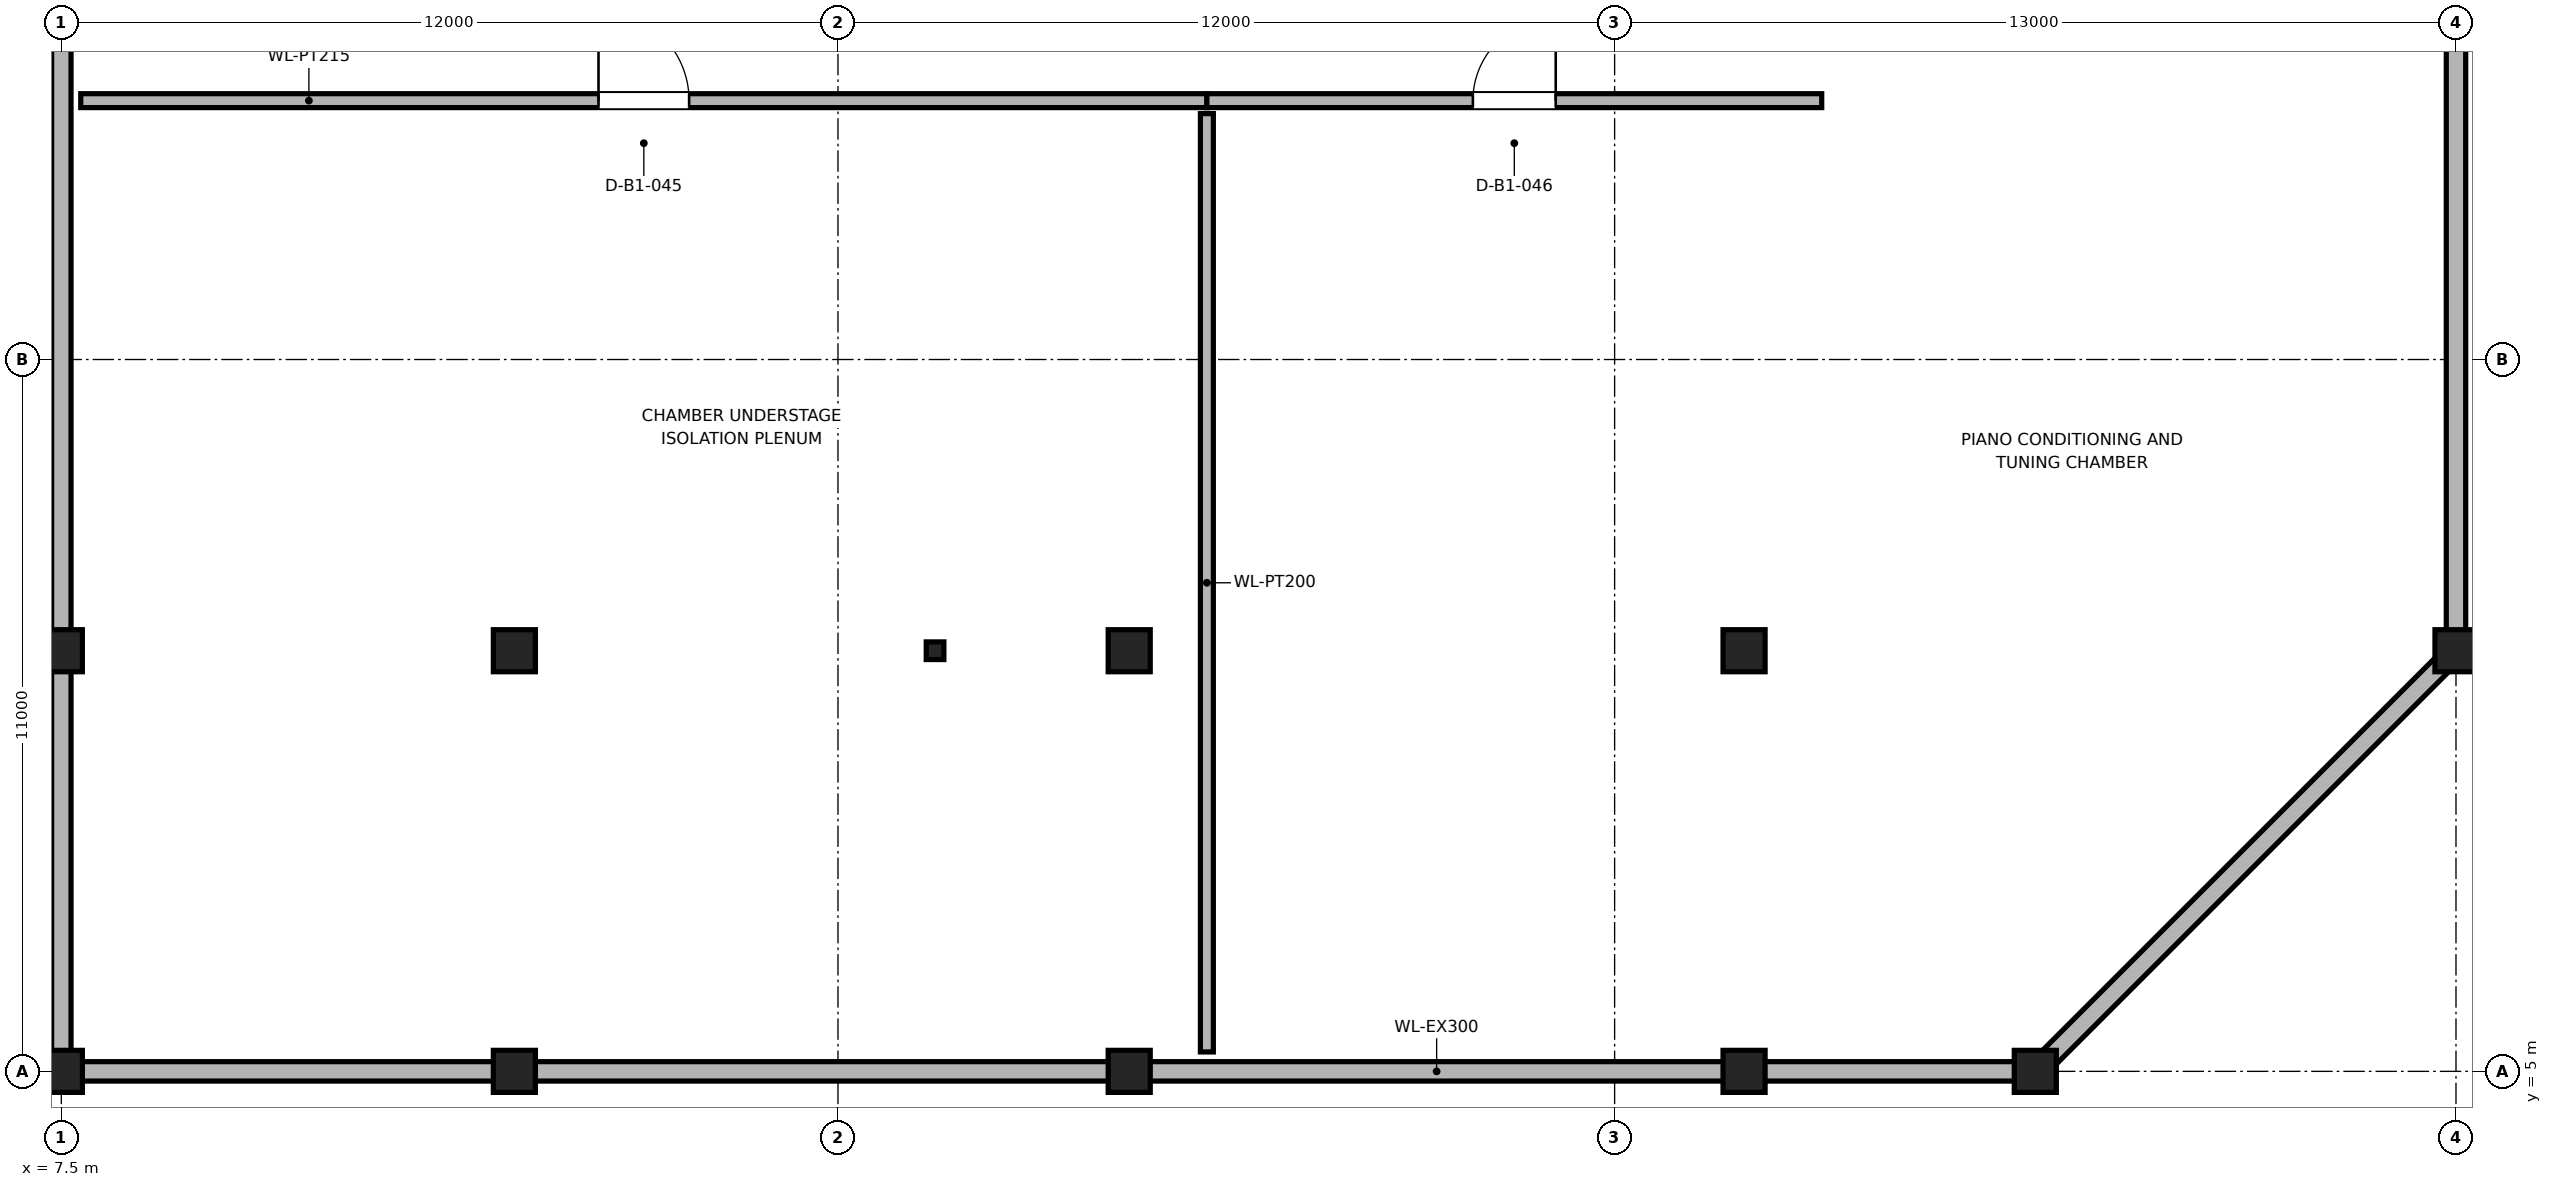
"""IFC4 building model, lengths in metres.
Left out: names, types, materials, properties, quantities, classifications, styles, units other than length and angle.
Written with IfcOpenShell. Run it as: python <this file> out.ifc"""

import sys

from ifc_helpers import new_model, si_unit, direction, frame, frame_2d, origin, origin_2d, place, context, subcontext, project, spatial, rectangle, hollow_circle, extrude, element, fill, save


model = new_model("IFC4")
c1 = context("Model", 3, precision=1e-05, world=origin(), true_north=direction((0.0, 1.0)))
c2 = subcontext(c1, "Body", "Model", "MODEL_VIEW")
j1 = project(units=[si_unit("LENGTHUNIT", "METRE"), si_unit("PLANEANGLEUNIT", "RADIAN")], contexts=[c1])
p1 = place(None, origin())
s1 = spatial("IfcSite", under=j1, at=p1, CompositionType="ELEMENT")
p2 = place(p1, origin())
s2 = spatial("IfcBuilding", under=s1, at=p2, CompositionType="ELEMENT")
p3 = place(p2, frame((0.0, 0.0, -4.8)))
s3 = spatial("IfcBuildingStorey", under=s2, at=p3, CompositionType="ELEMENT", Elevation=-4.8)
for number, where, z_axis, x_axis in (
    (1, (7.5, 5.0, 0.0), (0.0, 0.0, 1.0), (1.0, 0.0, 0.0)),
    (2, (14.5, 5.0, 0.0), (0.0, 0.0, 1.0), (1.0, 0.0, 0.0)),
    (3, (24.0, 5.0, 0.0), (0.0, 0.0, 1.0), (1.0, 0.0, 0.0)),
    (4, (33.5, 5.0, 0.0), (0.0, 0.0, 1.0), (1.0, 0.0, 0.0)),
    (5, (38.0, 5.0, 0.0), (0.0, 0.0, 1.0), (1.0, 0.0, 0.0)),
    (6, (44.5, 11.5, 0.0), (0.0, 0.0, 1.0), (1.0, 0.0, 0.0)),
    (7, (7.5, 11.5, 0.0), (0.0, 0.0, 1.0), (1.0, 0.0, 0.0)),
    (8, (14.5, 11.5, 0.0), (0.0, 0.0, 1.0), (1.0, 0.0, 0.0)),
    (9, (24.0, 11.5, 0.0), (0.0, 0.0, 1.0), (1.0, 0.0, 0.0)),
    (10, (33.5, 11.5, 0.0), (0.0, 0.0, 1.0), (1.0, 0.0, 0.0)),
):
    element("IfcColumn", number, at=place(p3, frame(where, z_axis=z_axis, x_axis=x_axis)), inside=s3, PredefinedType="COLUMN", context=c2, shape_type="SweptSolid", body=[
        extrude(rectangle(XDim=0.65, YDim=0.65, at=origin_2d()), origin(), (0.0, 0.0, 1.0), 4.8),
    ])
p4 = place(p3, frame((21.0, 11.5, 0.0), z_axis=(0.0, 0.0, 1.0), x_axis=(1.0, 0.0, 0.0)))
e11 = element("IfcColumn", 11, at=p4, inside=s3, PredefinedType="COLUMN", context=c2, shape_type="SweptSolid", body=[
    extrude(hollow_circle(Radius=0.136, WallThickness=0.016, at=origin_2d()), origin(), (0.0, 0.0, 1.0), 4.8),
])
p5 = place(p3, frame((14.48, 5.0, 0.0), z_axis=(0.0, 0.0, 1.0), x_axis=(-1.0, 0.0, 0.0)))
e12 = element("IfcWall", 12, at=p5, inside=s3, PredefinedType="SOLIDWALL", context=c2, shape_type="SweptSolid", body=[
    extrude(rectangle(XDim=6.96, YDim=0.3, at=frame_2d((3.48, 0.0))), origin(), (0.0, 0.0, 1.0), 3.738),
])
for number, where, z_axis, x_axis in (
    (13, (23.98, 5.0, 0.0), (0.0, 0.0, 1.0), (-1.0, 0.0, 0.0)),
    (14, (33.48, 5.0, 0.0), (0.0, 0.0, 1.0), (-1.0, 0.0, 0.0)),
):
    element("IfcWall", number, at=place(p3, frame(where, z_axis=z_axis, x_axis=x_axis)), inside=s3, PredefinedType="SOLIDWALL", context=c2, shape_type="SweptSolid", body=[
        extrude(rectangle(XDim=9.46, YDim=0.3, at=frame_2d((4.73, 0.0))), origin(), (0.0, 0.0, 1.0), 3.738),
    ])
p6 = place(p3, frame((37.98, 5.0, 0.0), z_axis=(0.0, 0.0, 1.0), x_axis=(-1.0, 0.0, 0.0)))
e15 = element("IfcWall", 15, at=p6, inside=s3, PredefinedType="SOLIDWALL", context=c2, shape_type="SweptSolid", body=[
    extrude(rectangle(XDim=4.46, YDim=0.3, at=frame_2d((2.23, 0.0))), origin(), (0.0, 0.0, 1.0), 3.738),
])
p7 = place(p3, frame((44.486, 11.486, 0.0), z_axis=(0.0, 0.0, 1.0), x_axis=(-0.707106781187, -0.707106781187, 0.0)))
e16 = element("IfcWall", 16, at=p7, inside=s3, PredefinedType="SOLIDWALL", context=c2, shape_type="SweptSolid", body=[
    extrude(rectangle(XDim=9.152, YDim=0.3, at=frame_2d((4.576, 0.0))), origin(), (0.0, 0.0, 1.0), 3.738),
])
for number, where, z_axis, x_axis in (
    (17, (44.5, 23.98, 0.0), (0.0, 0.0, 1.0), (0.0, -1.0, 0.0)),
    (18, (7.5, 11.52, 0.0), (0.0, 0.0, 1.0), (0.0, 1.0, 0.0)),
):
    element("IfcWall", number, at=place(p3, frame(where, z_axis=z_axis, x_axis=x_axis)), inside=s3, PredefinedType="SOLIDWALL", context=c2, shape_type="SweptSolid", body=[
        extrude(rectangle(XDim=12.46, YDim=0.3, at=frame_2d((6.23, 0.0))), origin(), (0.0, 0.0, 1.0), 3.738),
    ])
p8 = place(p3, frame((7.5, 5.02, 0.0), z_axis=(0.0, 0.0, 1.0), x_axis=(0.0, 1.0, 0.0)))
e19 = element("IfcWall", 19, at=p8, inside=s3, PredefinedType="SOLIDWALL", context=c2, shape_type="SweptSolid", body=[
    extrude(rectangle(XDim=6.46, YDim=0.3, at=frame_2d((3.23, 0.0))), origin(), (0.0, 0.0, 1.0), 3.738),
])
p9 = place(p3, frame((7.8, 20.0, 0.0), z_axis=(0.0, 0.0, 1.0), x_axis=(1.0, 0.0, 0.0)))
e20 = element("IfcWall", 20, at=p9, inside=s3, PredefinedType="PARTITIONING", context=c2, shape_type="SweptSolid", body=[
    extrude(rectangle(XDim=17.4, YDim=0.215, at=frame_2d((8.7, 0.0))), origin(), (0.0, 0.0, 1.0), 3.74),
])
p10 = place(p9, frame((8.0, 0.0, 0.0)))
e21 = element("IfcOpeningElement", 21, at=p10, cuts=e20, PredefinedType="OPENING", context=c2, shape_type="SweptSolid", body=[
    extrude(rectangle(XDim=1.4, YDim=2.2, at=frame_2d((0.7, 1.1))), frame((0.0, 0.117, 0.0), z_axis=(0.0, -1.0, 0.0), x_axis=(1.0, 0.0, 0.0)), (0.0, 0.0, 1.0), 0.235),
])
p11 = place(p3, frame((25.2, 20.0, 0.0), z_axis=(0.0, 0.0, 1.0), x_axis=(1.0, 0.0, 0.0)))
e22 = element("IfcWall", 22, at=p11, inside=s3, PredefinedType="PARTITIONING", context=c2, shape_type="SweptSolid", body=[
    extrude(rectangle(XDim=9.5, YDim=0.215, at=frame_2d((4.75, 0.0))), origin(), (0.0, 0.0, 1.0), 3.74),
])
p12 = place(p11, frame((4.11, 0.0, 0.0)))
e23 = element("IfcOpeningElement", 23, at=p12, cuts=e22, PredefinedType="OPENING", context=c2, shape_type="SweptSolid", body=[
    extrude(rectangle(XDim=1.28, YDim=2.18, at=frame_2d((0.64, 1.09))), frame((0.0, 0.117, 0.0), z_axis=(0.0, -1.0, 0.0), x_axis=(1.0, 0.0, 0.0)), (0.0, 0.0, 1.0), 0.235),
])
p13 = place(p3, frame((25.2, 5.3, 0.0), z_axis=(0.0, 0.0, 1.0), x_axis=(0.0, 1.0, 0.0)))
e24 = element("IfcWall", 24, at=p13, inside=s3, PredefinedType="PARTITIONING", context=c2, shape_type="SweptSolid", body=[
    extrude(rectangle(XDim=14.5, YDim=0.2, at=frame_2d((7.25, 0.0))), origin(), (0.0, 0.0, 1.0), 3.74),
])
p14 = place(p10, origin())
e25 = element("IfcDoor", 25, at=p14, inside=s3, OperationType="SINGLE_SWING_LEFT", PredefinedType="DOOR", context=c2, shape_type="SweptSolid", body=[
    extrude(rectangle(XDim=1.4, YDim=2.2, at=frame_2d((0.7, 1.1))), frame((0.0, 0.025, 0.0), z_axis=(0.0, -1.0, 0.0), x_axis=(1.0, 0.0, 0.0)), (0.0, 0.0, 1.0), 0.05),
])
fill(e21, e25)
p15 = place(p12, origin())
e26 = element("IfcDoor", 26, at=p15, inside=s3, OperationType="SINGLE_SWING_RIGHT", PredefinedType="DOOR", context=c2, shape_type="SweptSolid", body=[
    extrude(rectangle(XDim=1.28, YDim=2.18, at=frame_2d((0.64, 1.09))), frame((0.0, 0.025, 0.0), z_axis=(0.0, -1.0, 0.0), x_axis=(1.0, 0.0, 0.0)), (0.0, 0.0, 1.0), 0.05),
])
fill(e23, e26)
save(model, sys.argv[1])
